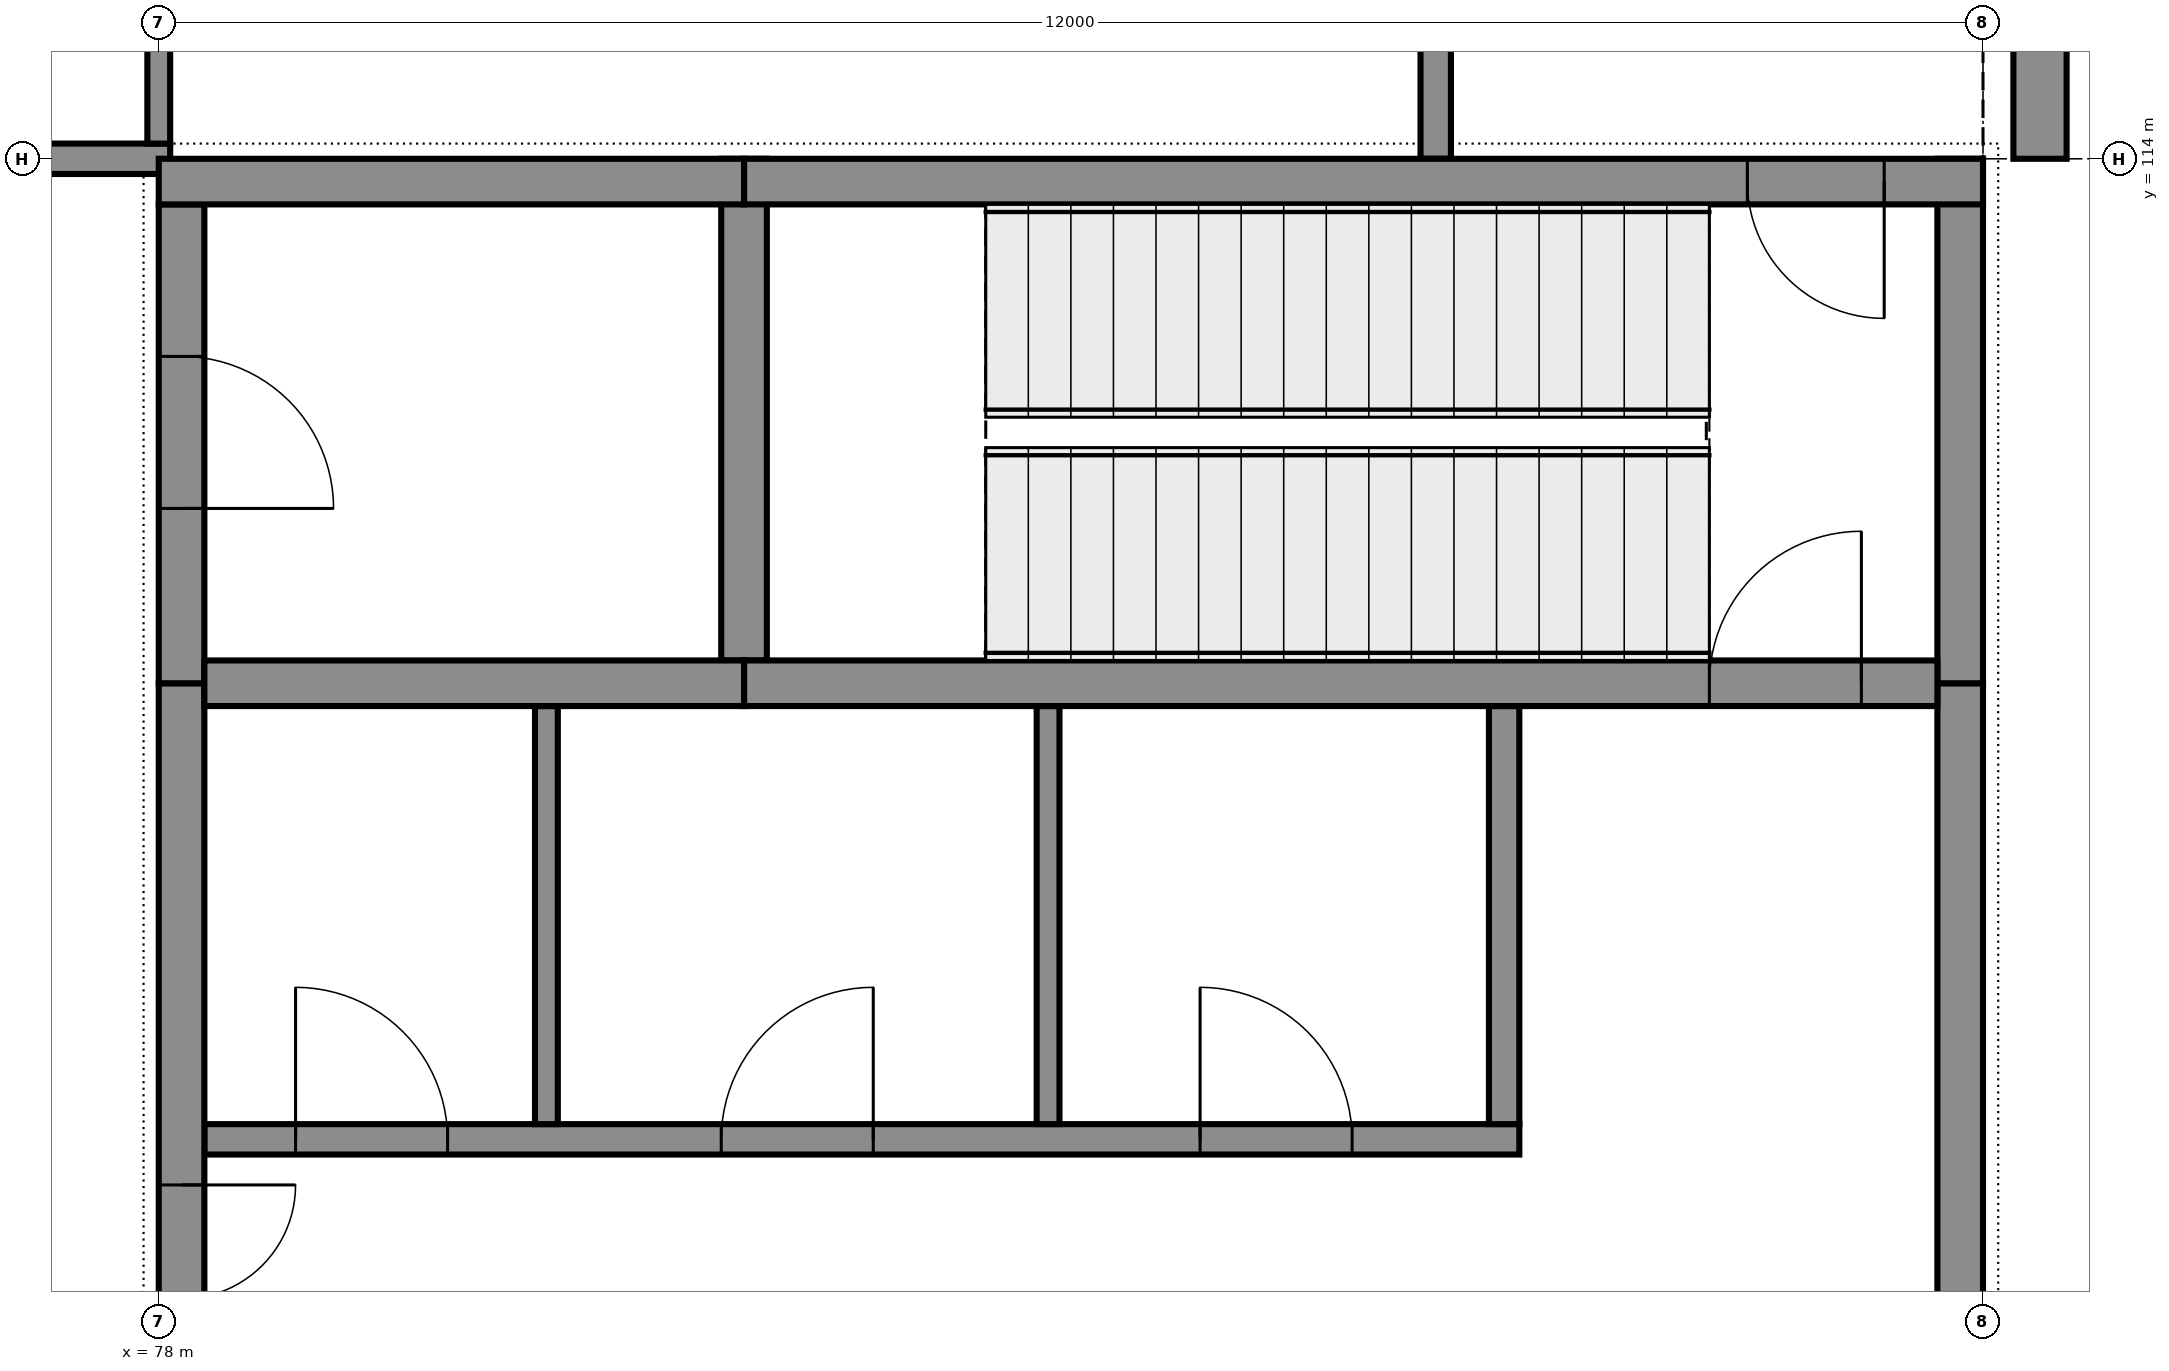
"""IFC4 building model, lengths in metres.
Left out: names, types, materials, properties, quantities, classifications, styles, units other than length and angle.
Written with IfcOpenShell. Run it as: python <this file> out.ifc"""

import sys

from ifc_helpers import new_model, si_unit, direction, frame, frame_2d, origin, place, context, subcontext, project, spatial, rectangle, extrude, element, fill, save


model = new_model("IFC4")
c1 = context("Model", 3, precision=1e-05, world=origin(), true_north=direction((0.0, 1.0)))
c2 = subcontext(c1, "Body", "Model", "MODEL_VIEW")
j1 = project(units=[si_unit("LENGTHUNIT", "METRE"), si_unit("PLANEANGLEUNIT", "RADIAN")], contexts=[c1])
p1 = place(None, origin())
s1 = spatial("IfcSite", under=j1, at=p1, CompositionType="ELEMENT")
p2 = place(p1, origin())
s2 = spatial("IfcBuilding", under=s1, at=p2, CompositionType="ELEMENT")
p3 = place(p2, frame((0.0, 0.0, 6.0)))
s3 = spatial("IfcBuildingStorey", under=s2, at=p3, CompositionType="ELEMENT", Elevation=6.0)
p4 = place(p3, frame((90.0, 113.85, 0.0), z_axis=(0.0, 0.0, 1.0), x_axis=(-1.0, 0.0, 0.0)))
e1 = element("IfcWall", 1, at=p4, inside=s3, PredefinedType="SHEAR", context=c2, shape_type="SweptSolid", body=[
    extrude(rectangle(XDim=8.15, YDim=0.3, at=frame_2d((4.075, 0.0))), origin(), (0.0, 0.0, 1.0), 5.75),
])
p5 = place(p4, frame((0.65, 0.0, 0.0)))
e2 = element("IfcOpeningElement", 2, at=p5, cuts=e1, PredefinedType="OPENING", context=c2, shape_type="SweptSolid", body=[
    extrude(rectangle(XDim=0.9, YDim=2.1, at=frame_2d((0.45, 1.05))), frame((0.0, 0.16, 0.0), z_axis=(0.0, -1.0, 0.0), x_axis=(1.0, 0.0, 0.0)), (0.0, 0.0, 1.0), 0.32),
])
p6 = place(p3, frame((81.85, 113.85, 0.0), z_axis=(0.0, 0.0, 1.0), x_axis=(-1.0, 0.0, 0.0)))
e3 = element("IfcWall", 3, at=p6, inside=s3, PredefinedType="SHEAR", context=c2, shape_type="SweptSolid", body=[
    extrude(rectangle(XDim=3.85, YDim=0.3, at=frame_2d((1.925, 0.0))), origin(), (0.0, 0.0, 1.0), 5.75),
])
p7 = place(p3, frame((89.7, 110.55, 0.0), z_axis=(0.0, 0.0, 1.0), x_axis=(-1.0, 0.0, 0.0)))
e4 = element("IfcWall", 4, at=p7, inside=s3, PredefinedType="SHEAR", context=c2, shape_type="SweptSolid", body=[
    extrude(rectangle(XDim=7.85, YDim=0.3, at=frame_2d((3.925, 0.0))), origin(), (0.0, 0.0, 1.0), 5.75),
])
p8 = place(p7, frame((0.5, 0.0, 0.0)))
e5 = element("IfcOpeningElement", 5, at=p8, cuts=e4, PredefinedType="OPENING", context=c2, shape_type="SweptSolid", body=[
    extrude(rectangle(XDim=1.0, YDim=2.1, at=frame_2d((0.5, 1.05))), frame((0.0, 0.16, 0.0), z_axis=(0.0, -1.0, 0.0), x_axis=(1.0, 0.0, 0.0)), (0.0, 0.0, 1.0), 0.32),
])
p9 = place(p3, frame((81.85, 110.55, 0.0), z_axis=(0.0, 0.0, 1.0), x_axis=(-1.0, 0.0, 0.0)))
e6 = element("IfcWall", 6, at=p9, inside=s3, PredefinedType="SHEAR", context=c2, shape_type="SweptSolid", body=[
    extrude(rectangle(XDim=3.55, YDim=0.3, at=frame_2d((1.775, 0.0))), origin(), (0.0, 0.0, 1.0), 5.75),
])
p10 = place(p3, frame((89.85, 105.45, 0.0), z_axis=(0.0, 0.0, 1.0), x_axis=(0.0, 1.0, 0.0)))
e7 = element("IfcWall", 7, at=p10, inside=s3, PredefinedType="SHEAR", context=c2, shape_type="SweptSolid", body=[
    extrude(rectangle(XDim=5.1, YDim=0.3, at=frame_2d((2.55, 0.0))), origin(), (0.0, 0.0, 1.0), 5.75),
])
p11 = place(p3, frame((89.85, 110.55, 0.0), z_axis=(0.0, 0.0, 1.0), x_axis=(0.0, 1.0, 0.0)))
e8 = element("IfcWall", 8, at=p11, inside=s3, PredefinedType="SHEAR", context=c2, shape_type="SweptSolid", body=[
    extrude(rectangle(XDim=3.45, YDim=0.3, at=frame_2d((1.725, 0.0))), origin(), (0.0, 0.0, 1.0), 5.75),
])
p12 = place(p3, frame((78.15, 105.45, 0.0), z_axis=(0.0, 0.0, 1.0), x_axis=(0.0, 1.0, 0.0)))
e9 = element("IfcWall", 9, at=p12, inside=s3, PredefinedType="SHEAR", context=c2, shape_type="SweptSolid", body=[
    extrude(rectangle(XDim=5.1, YDim=0.3, at=frame_2d((2.55, 0.0))), origin(), (0.0, 0.0, 1.0), 5.75),
])
p13 = place(p12, frame((0.3, 0.0, 0.0)))
e10 = element("IfcOpeningElement", 10, at=p13, cuts=e9, PredefinedType="OPENING", context=c2, shape_type="SweptSolid", body=[
    extrude(rectangle(XDim=1.5, YDim=2.1, at=frame_2d((0.75, 1.05))), frame((0.0, 0.16, 0.0), z_axis=(0.0, -1.0, 0.0), x_axis=(1.0, 0.0, 0.0)), (0.0, 0.0, 1.0), 0.32),
])
p14 = place(p3, frame((78.15, 110.55, 0.0), z_axis=(0.0, 0.0, 1.0), x_axis=(0.0, 1.0, 0.0)))
e11 = element("IfcWall", 11, at=p14, inside=s3, PredefinedType="SHEAR", context=c2, shape_type="SweptSolid", body=[
    extrude(rectangle(XDim=3.15, YDim=0.3, at=frame_2d((1.575, 0.0))), origin(), (0.0, 0.0, 1.0), 5.75),
])
p15 = place(p14, frame((1.15, 0.0, 0.0)))
e12 = element("IfcOpeningElement", 12, at=p15, cuts=e11, PredefinedType="OPENING", context=c2, shape_type="SweptSolid", body=[
    extrude(rectangle(XDim=1.0, YDim=2.1, at=frame_2d((0.5, 1.05))), frame((0.0, 0.16, 0.0), z_axis=(0.0, -1.0, 0.0), x_axis=(1.0, 0.0, 0.0)), (0.0, 0.0, 1.0), 0.32),
])
p16 = place(p3, frame((81.85, 110.7, 0.0), z_axis=(0.0, 0.0, 1.0), x_axis=(0.0, 1.0, 0.0)))
e13 = element("IfcWall", 13, at=p16, inside=s3, PredefinedType="SHEAR", context=c2, shape_type="SweptSolid", body=[
    extrude(rectangle(XDim=3.3, YDim=0.3, at=frame_2d((1.65, 0.0))), origin(), (0.0, 0.0, 1.0), 5.75),
])
p17 = place(p3, frame((90.375, 114.0, 0.0), z_axis=(0.0, 0.0, 1.0), x_axis=(0.0, 1.0, 0.0)))
e14 = element("IfcWall", 14, at=p17, inside=s3, PredefinedType="STANDARD", context=c2, shape_type="SweptSolid", body=[
    extrude(rectangle(XDim=11.5, YDim=0.35, at=frame_2d((5.75, 0.0))), origin(), (0.0, 0.0, 1.0), 6.0),
])
p18 = place(p17, frame((4.55, 0.0, 0.9)))
e15 = element("IfcOpeningElement", 15, at=p18, cuts=e14, PredefinedType="OPENING", context=c2, shape_type="SweptSolid", body=[
    extrude(rectangle(XDim=2.4, YDim=1.8, at=frame_2d((1.2, 0.9))), frame((0.0, 0.185, 0.0), z_axis=(0.0, -1.0, 0.0), x_axis=(1.0, 0.0, 0.0)), (0.0, 0.0, 1.0), 0.37),
])
p19 = place(p3, frame((78.3, 107.55, 0.0), z_axis=(0.0, 0.0, 1.0), x_axis=(1.0, 0.0, 0.0)))
e16 = element("IfcWall", 16, at=p19, inside=s3, PredefinedType="PARTITIONING", context=c2, shape_type="SweptSolid", body=[
    extrude(rectangle(XDim=8.65, YDim=0.2, at=frame_2d((4.325, 0.0))), origin(), (0.0, 0.0, 1.0), 5.75),
])
p20 = place(p19, frame((0.6, 0.0, 0.0)))
e17 = element("IfcOpeningElement", 17, at=p20, cuts=e16, PredefinedType="OPENING", context=c2, shape_type="SweptSolid", body=[
    extrude(rectangle(XDim=1.0, YDim=2.1, at=frame_2d((0.5, 1.05))), frame((0.0, 0.11, 0.0), z_axis=(0.0, -1.0, 0.0), x_axis=(1.0, 0.0, 0.0)), (0.0, 0.0, 1.0), 0.22),
])
p21 = place(p19, frame((3.4, 0.0, 0.0)))
e18 = element("IfcOpeningElement", 18, at=p21, cuts=e16, PredefinedType="OPENING", context=c2, shape_type="SweptSolid", body=[
    extrude(rectangle(XDim=1.0, YDim=2.1, at=frame_2d((0.5, 1.05))), frame((0.0, 0.11, 0.0), z_axis=(0.0, -1.0, 0.0), x_axis=(1.0, 0.0, 0.0)), (0.0, 0.0, 1.0), 0.22),
])
p22 = place(p19, frame((6.55, 0.0, 0.0)))
e19 = element("IfcOpeningElement", 19, at=p22, cuts=e16, PredefinedType="OPENING", context=c2, shape_type="SweptSolid", body=[
    extrude(rectangle(XDim=1.0, YDim=2.1, at=frame_2d((0.5, 1.05))), frame((0.0, 0.11, 0.0), z_axis=(0.0, -1.0, 0.0), x_axis=(1.0, 0.0, 0.0)), (0.0, 0.0, 1.0), 0.22),
])
p23 = place(p3, frame((71.9, 114.0, 0.0), z_axis=(0.0, 0.0, 1.0), x_axis=(1.0, 0.0, 0.0)))
e20 = element("IfcWall", 20, at=p23, inside=s3, PredefinedType="PARTITIONING", context=c2, shape_type="SweptSolid", body=[
    extrude(rectangle(XDim=6.175, YDim=0.2, at=frame_2d((3.087, 0.0))), origin(), (0.0, 0.0, 1.0), 4.75),
])
p24 = place(p3, frame((78.0, 114.1, 0.0), z_axis=(0.0, 0.0, 1.0), x_axis=(0.0, 1.0, 0.0)))
e21 = element("IfcWall", 21, at=p24, inside=s3, PredefinedType="PARTITIONING", context=c2, shape_type="SweptSolid", body=[
    extrude(rectangle(XDim=23.825, YDim=0.15, at=frame_2d((11.913, 0.0))), origin(), (0.0, 0.0, 1.0), 4.75),
])
for number, where, z_axis, x_axis in (
    (22, (80.55, 107.65, 0.0), (0.0, 0.0, 1.0), (0.0, 1.0, 0.0)),
    (23, (83.85, 107.65, 0.0), (0.0, 0.0, 1.0), (0.0, 1.0, 0.0)),
):
    element("IfcWall", number, at=place(p3, frame(where, z_axis=z_axis, x_axis=x_axis)), inside=s3, PredefinedType="PARTITIONING", context=c2, shape_type="SweptSolid", body=[
        extrude(rectangle(XDim=2.75, YDim=0.15, at=frame_2d((1.375, 0.0))), origin(), (0.0, 0.0, 1.0), 5.75),
    ])
p25 = place(p3, frame((86.4, 114.0, 0.0), z_axis=(0.0, 0.0, 1.0), x_axis=(0.0, 1.0, 0.0)))
e24 = element("IfcWall", 24, at=p25, inside=s3, PredefinedType="PARTITIONING", context=c2, shape_type="SweptSolid", body=[
    extrude(rectangle(XDim=36.0, YDim=0.2, at=frame_2d((18.0, 0.0))), origin(), (0.0, 0.0, 1.0), 5.75),
])
p26 = place(p25, frame((2.5, 0.0, 0.0)))
e25 = element("IfcOpeningElement", 25, at=p26, cuts=e24, PredefinedType="OPENING", context=c2, shape_type="SweptSolid", body=[
    extrude(rectangle(XDim=1.0, YDim=2.1, at=frame_2d((0.5, 1.05))), frame((0.0, 0.11, 0.0), z_axis=(0.0, -1.0, 0.0), x_axis=(1.0, 0.0, 0.0)), (0.0, 0.0, 1.0), 0.22),
])
p27 = place(p25, frame((8.5, 0.0, 0.0)))
e26 = element("IfcOpeningElement", 26, at=p27, cuts=e24, PredefinedType="OPENING", context=c2, shape_type="SweptSolid", body=[
    extrude(rectangle(XDim=1.0, YDim=2.1, at=frame_2d((0.5, 1.05))), frame((0.0, 0.11, 0.0), z_axis=(0.0, -1.0, 0.0), x_axis=(1.0, 0.0, 0.0)), (0.0, 0.0, 1.0), 0.22),
])
p28 = place(p25, frame((14.5, 0.0, 0.0)))
e27 = element("IfcOpeningElement", 27, at=p28, cuts=e24, PredefinedType="OPENING", context=c2, shape_type="SweptSolid", body=[
    extrude(rectangle(XDim=1.0, YDim=2.1, at=frame_2d((0.5, 1.05))), frame((0.0, 0.11, 0.0), z_axis=(0.0, -1.0, 0.0), x_axis=(1.0, 0.0, 0.0)), (0.0, 0.0, 1.0), 0.22),
])
p29 = place(p25, frame((20.5, 0.0, 0.0)))
e28 = element("IfcOpeningElement", 28, at=p29, cuts=e24, PredefinedType="OPENING", context=c2, shape_type="SweptSolid", body=[
    extrude(rectangle(XDim=1.0, YDim=2.1, at=frame_2d((0.5, 1.05))), frame((0.0, 0.11, 0.0), z_axis=(0.0, -1.0, 0.0), x_axis=(1.0, 0.0, 0.0)), (0.0, 0.0, 1.0), 0.22),
])
p30 = place(p25, frame((26.5, 0.0, 0.0)))
e29 = element("IfcOpeningElement", 29, at=p30, cuts=e24, PredefinedType="OPENING", context=c2, shape_type="SweptSolid", body=[
    extrude(rectangle(XDim=1.0, YDim=2.1, at=frame_2d((0.5, 1.05))), frame((0.0, 0.11, 0.0), z_axis=(0.0, -1.0, 0.0), x_axis=(1.0, 0.0, 0.0)), (0.0, 0.0, 1.0), 0.22),
])
p31 = place(p25, frame((32.5, 0.0, 0.0)))
e30 = element("IfcOpeningElement", 30, at=p31, cuts=e24, PredefinedType="OPENING", context=c2, shape_type="SweptSolid", body=[
    extrude(rectangle(XDim=1.0, YDim=2.1, at=frame_2d((0.5, 1.05))), frame((0.0, 0.11, 0.0), z_axis=(0.0, -1.0, 0.0), x_axis=(1.0, 0.0, 0.0)), (0.0, 0.0, 1.0), 0.22),
])
p32 = place(p3, frame((86.85, 107.65, 0.0), z_axis=(0.0, 0.0, 1.0), x_axis=(0.0, 1.0, 0.0)))
e31 = element("IfcWall", 31, at=p32, inside=s3, PredefinedType="PARTITIONING", context=c2, shape_type="SweptSolid", body=[
    extrude(rectangle(XDim=2.75, YDim=0.2, at=frame_2d((1.375, 0.0))), origin(), (0.0, 0.0, 1.0), 5.75),
])
p33 = place(p13, frame((1.5, 0.0, 0.0), z_axis=(0.0, 0.0, 1.0), x_axis=(-1.0, 0.0, 0.0)))
e32 = element("IfcDoor", 32, at=p33, inside=s3, OperationType="DOUBLE_DOOR_SINGLE_SWING", PredefinedType="DOOR", context=c2, shape_type="SweptSolid", body=[
    extrude(rectangle(XDim=1.5, YDim=2.1, at=frame_2d((0.75, 1.05))), frame((0.0, 0.025, 0.0), z_axis=(0.0, -1.0, 0.0), x_axis=(1.0, 0.0, 0.0)), (0.0, 0.0, 1.0), 0.05),
])
fill(e10, e32)
p34 = place(p20, origin())
e33 = element("IfcDoor", 33, at=p34, inside=s3, OperationType="SINGLE_SWING_RIGHT", PredefinedType="DOOR", context=c2, shape_type="SweptSolid", body=[
    extrude(rectangle(XDim=1.0, YDim=2.1, at=frame_2d((0.5, 1.05))), frame((0.0, 0.025, 0.0), z_axis=(0.0, -1.0, 0.0), x_axis=(1.0, 0.0, 0.0)), (0.0, 0.0, 1.0), 0.05),
])
fill(e17, e33)
p35 = place(p21, origin())
e34 = element("IfcDoor", 34, at=p35, inside=s3, OperationType="SINGLE_SWING_LEFT", PredefinedType="DOOR", context=c2, shape_type="SweptSolid", body=[
    extrude(rectangle(XDim=1.0, YDim=2.1, at=frame_2d((0.5, 1.05))), frame((0.0, 0.025, 0.0), z_axis=(0.0, -1.0, 0.0), x_axis=(1.0, 0.0, 0.0)), (0.0, 0.0, 1.0), 0.05),
])
fill(e18, e34)
p36 = place(p22, origin())
e35 = element("IfcDoor", 35, at=p36, inside=s3, OperationType="SINGLE_SWING_RIGHT", PredefinedType="DOOR", context=c2, shape_type="SweptSolid", body=[
    extrude(rectangle(XDim=1.0, YDim=2.1, at=frame_2d((0.5, 1.05))), frame((0.0, 0.025, 0.0), z_axis=(0.0, -1.0, 0.0), x_axis=(1.0, 0.0, 0.0)), (0.0, 0.0, 1.0), 0.05),
])
fill(e19, e35)
p37 = place(p8, frame((1.0, 0.0, 0.0), z_axis=(0.0, 0.0, 1.0), x_axis=(-1.0, 0.0, 0.0)))
e36 = element("IfcDoor", 36, at=p37, inside=s3, OperationType="SINGLE_SWING_LEFT", PredefinedType="DOOR", context=c2, shape_type="SweptSolid", body=[
    extrude(rectangle(XDim=1.0, YDim=2.1, at=frame_2d((0.5, 1.05))), frame((0.0, 0.025, 0.0), z_axis=(0.0, -1.0, 0.0), x_axis=(1.0, 0.0, 0.0)), (0.0, 0.0, 1.0), 0.05),
])
fill(e5, e36)
p38 = place(p15, frame((1.0, 0.0, 0.0), z_axis=(0.0, 0.0, 1.0), x_axis=(-1.0, 0.0, 0.0)))
e37 = element("IfcDoor", 37, at=p38, inside=s3, OperationType="SINGLE_SWING_LEFT", PredefinedType="DOOR", context=c2, shape_type="SweptSolid", body=[
    extrude(rectangle(XDim=1.0, YDim=2.1, at=frame_2d((0.5, 1.05))), frame((0.0, 0.025, 0.0), z_axis=(0.0, -1.0, 0.0), x_axis=(1.0, 0.0, 0.0)), (0.0, 0.0, 1.0), 0.05),
])
fill(e12, e37)
p39 = place(p5, origin())
e38 = element("IfcDoor", 38, at=p39, inside=s3, OperationType="SINGLE_SWING_RIGHT", PredefinedType="DOOR", context=c2, shape_type="SweptSolid", body=[
    extrude(rectangle(XDim=0.9, YDim=2.1, at=frame_2d((0.45, 1.05))), frame((0.0, 0.025, 0.0), z_axis=(0.0, -1.0, 0.0), x_axis=(1.0, 0.0, 0.0)), (0.0, 0.0, 1.0), 0.05),
])
fill(e2, e38)
save(model, sys.argv[1])
